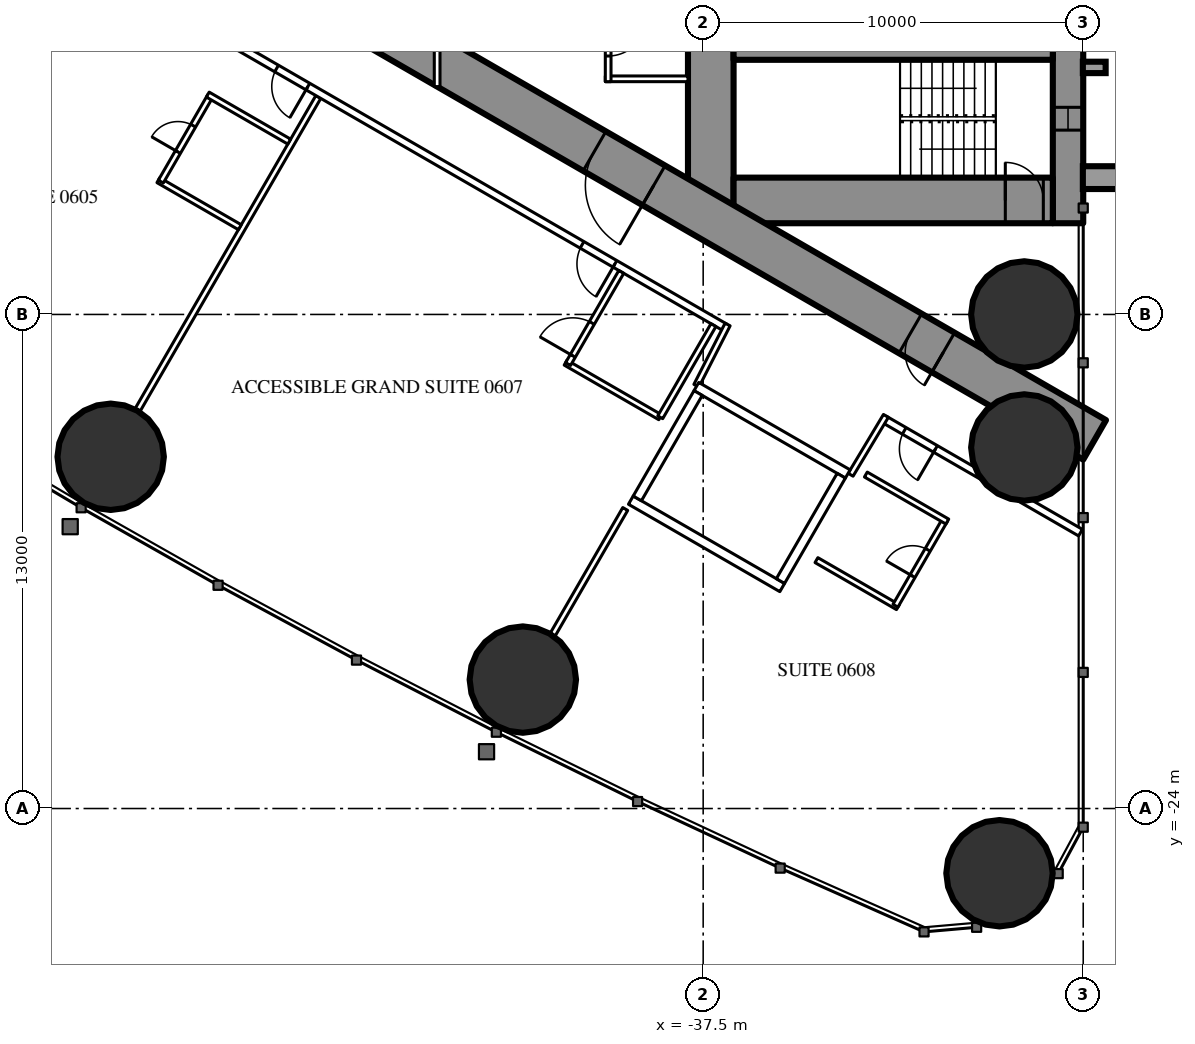
"""IFC4 building model, lengths in metres.
Left out: names, types, materials, properties, quantities, classifications, styles, units other than length and angle.
Written with IfcOpenShell. Run it as: python <this file> out.ifc"""

import sys

from ifc_helpers import new_model, si_unit, direction, frame, frame_2d, origin, origin_2d, place, context, subcontext, project, spatial, rectangle, hollow_circle, extrude, element, fill, save


model = new_model("IFC4")
c1 = context("Model", 3, precision=1e-05, world=origin(), true_north=direction((0.0, 1.0)))
c2 = subcontext(c1, "Body", "Model", "MODEL_VIEW")
j1 = project(units=[si_unit("LENGTHUNIT", "METRE"), si_unit("PLANEANGLEUNIT", "RADIAN")], contexts=[c1])
p1 = place(None, origin())
s1 = spatial("IfcSite", under=j1, at=p1, CompositionType="ELEMENT")
p2 = place(p1, origin())
s2 = spatial("IfcBuilding", under=s1, at=p2, CompositionType="ELEMENT")
p3 = place(p2, frame((0.0, 0.0, 28.5)))
s3 = spatial("IfcBuildingStorey", under=s2, at=p3, CompositionType="ELEMENT", Elevation=28.5)
for number, where, z_axis, x_axis in (
    (1, (-29.703, -25.703, 0.0), (0.0, 0.0, 1.0), (1.0, 0.0, 0.0)),
    (2, (-29.05, -11.0, 0.0), (0.0, 0.0, 1.0), (1.0, 0.0, 0.0)),
    (3, (-29.05, -14.5, 0.0), (0.0, 0.0, 1.0), (1.0, 0.0, 0.0)),
    (4, (-53.09, -14.745, 0.0), (0.0, 0.0, 1.0), (1.0, 0.0, 0.0)),
    (5, (-42.245, -20.607, 0.0), (0.0, 0.0, 1.0), (1.0, 0.0, 0.0)),
):
    element("IfcColumn", number, at=place(p3, frame(where, z_axis=z_axis, x_axis=x_axis)), inside=s3, PredefinedType="COLUMN", context=c2, shape_type="SweptSolid", body=[
        extrude(hollow_circle(Radius=1.4, WallThickness=0.12, at=origin_2d()), origin(), (0.0, 0.0, 1.0), 3.5),
    ])
p4 = place(p3, frame((-27.9, 8.6, 0.0), z_axis=(0.0, 0.0, 1.0), x_axis=(0.0, -1.0, 0.0)))
e6 = element("IfcWall", 6, at=p4, inside=s3, PredefinedType="SHEAR", context=c2, shape_type="SweptSolid", body=[
    extrude(rectangle(XDim=17.2, YDim=0.8, at=frame_2d((8.6, 0.0))), origin(), (0.0, 0.0, 1.0), 3.5),
])
p5 = place(p4, frame((2.45, 0.0, 0.6)))
e7 = element("IfcOpeningElement", 7, at=p5, cuts=e6, PredefinedType="OPENING", context=c2, shape_type="SweptSolid", body=[
    extrude(rectangle(XDim=0.6, YDim=2.1, at=frame_2d((0.3, 1.05))), frame((0.0, 0.41, 0.0), z_axis=(0.0, -1.0, 0.0), x_axis=(1.0, 0.0, 0.0)), (0.0, 0.0, 1.0), 0.82),
])
p6 = place(p4, frame((14.15, 0.0, 0.6)))
e8 = element("IfcOpeningElement", 8, at=p6, cuts=e6, PredefinedType="OPENING", context=c2, shape_type="SweptSolid", body=[
    extrude(rectangle(XDim=0.6, YDim=2.1, at=frame_2d((0.3, 1.05))), frame((0.0, 0.41, 0.0), z_axis=(0.0, -1.0, 0.0), x_axis=(1.0, 0.0, 0.0)), (0.0, 0.0, 1.0), 0.82),
])
p7 = place(p3, frame((-37.3, 8.6, 0.0), z_axis=(0.0, 0.0, 1.0), x_axis=(0.0, -1.0, 0.0)))
e9 = element("IfcWall", 9, at=p7, inside=s3, PredefinedType="SHEAR", context=c2, shape_type="SweptSolid", body=[
    extrude(rectangle(XDim=17.2, YDim=1.2, at=frame_2d((8.6, 0.0))), origin(), (0.0, 0.0, 1.0), 3.5),
])
p8 = place(p7, frame((7.7, 0.0, 0.0)))
e10 = element("IfcOpeningElement", 10, at=p8, cuts=e9, PredefinedType="OPENING", context=c2, shape_type="SweptSolid", body=[
    extrude(rectangle(XDim=1.8, YDim=2.2, at=frame_2d((0.9, 1.1))), frame((0.0, 0.61, 0.0), z_axis=(0.0, -1.0, 0.0), x_axis=(1.0, 0.0, 0.0)), (0.0, 0.0, 1.0), 1.22),
])
p9 = place(p3, frame((-28.3, -8.0, 0.0), z_axis=(0.0, 0.0, 1.0), x_axis=(-1.0, 0.0, 0.0)))
e11 = element("IfcWall", 11, at=p9, inside=s3, PredefinedType="SHEAR", context=c2, shape_type="SweptSolid", body=[
    extrude(rectangle(XDim=8.4, YDim=1.2, at=frame_2d((4.2, 0.0))), origin(), (0.0, 0.0, 1.0), 3.5),
])
p10 = place(p9, frame((0.25, 0.0, 0.0)))
e12 = element("IfcOpeningElement", 12, at=p10, cuts=e11, PredefinedType="OPENING", context=c2, shape_type="SweptSolid", body=[
    extrude(rectangle(XDim=1.0, YDim=2.2, at=frame_2d((0.5, 1.1))), frame((0.0, 0.61, 0.0), z_axis=(0.0, -1.0, 0.0), x_axis=(1.0, 0.0, 0.0)), (0.0, 0.0, 1.0), 1.22),
])
p11 = place(p3, frame((-28.3, -4.15, 0.0), z_axis=(0.0, 0.0, 1.0), x_axis=(-1.0, 0.0, 0.0)))
e13 = element("IfcWall", 13, at=p11, inside=s3, PredefinedType="SHEAR", context=c2, shape_type="SweptSolid", body=[
    extrude(rectangle(XDim=8.4, YDim=0.3, at=frame_2d((4.2, 0.0))), origin(), (0.0, 0.0, 1.0), 3.5),
])
p12 = place(p3, frame((-27.2, -14.3, 0.0), z_axis=(0.0, 0.0, 1.0), x_axis=(-0.866024021859, 0.500002393557, 0.0)))
e14 = element("IfcWall", 14, at=p12, inside=s3, PredefinedType="SHEAR", context=c2, shape_type="SweptSolid", body=[
    extrude(rectangle(XDim=27.907, YDim=1.2, at=frame_2d((13.954, 0.0))), origin(), (0.0, 0.0, 1.0), 3.5),
])
p13 = place(p12, frame((4.6, 0.0, 0.0)))
e15 = element("IfcOpeningElement", 15, at=p13, cuts=e14, PredefinedType="OPENING", context=c2, shape_type="SweptSolid", body=[
    extrude(rectangle(XDim=1.0, YDim=2.2, at=frame_2d((0.5, 1.1))), frame((0.0, 0.61, 0.0), z_axis=(0.0, -1.0, 0.0), x_axis=(1.0, 0.0, 0.0)), (0.0, 0.0, 1.0), 1.22),
])
p14 = place(p12, frame((13.395, 0.0, 0.0)))
e16 = element("IfcOpeningElement", 16, at=p14, cuts=e14, PredefinedType="OPENING", context=c2, shape_type="SweptSolid", body=[
    extrude(rectangle(XDim=1.8, YDim=2.2, at=frame_2d((0.9, 1.1))), frame((0.0, 0.61, 0.0), z_axis=(0.0, -1.0, 0.0), x_axis=(1.0, 0.0, 0.0)), (0.0, 0.0, 1.0), 1.22),
])
p15 = place(p3, frame((-47.627, -5.278, 0.0), z_axis=(0.0, 0.0, 1.0), x_axis=(-0.500009844318, -0.86601972009, 0.0)))
e17 = element("IfcWall", 17, at=p15, inside=s3, PredefinedType="PARTITIONING", context=c2, shape_type="SweptSolid", body=[
    extrude(rectangle(XDim=9.51, YDim=0.15, at=frame_2d((4.755, 0.0))), origin(), (0.0, 0.0, 1.0), 2.25),
])
p16 = place(p3, frame((-39.551, -16.118, 0.0), z_axis=(0.0, 0.0, 1.0), x_axis=(-0.499986503906, -0.866033195618, 0.0)))
e18 = element("IfcWall", 18, at=p16, inside=s3, PredefinedType="PARTITIONING", context=c2, shape_type="SweptSolid", body=[
    extrude(rectangle(XDim=3.815, YDim=0.15, at=frame_2d((1.907, 0.0))), origin(), (0.0, 0.0, 1.0), 3.25),
])
p17 = place(p3, frame((-27.572, -16.741, 0.0), z_axis=(0.0, 0.0, 1.0), x_axis=(-0.866024464444, 0.500001626982, 0.0)))
e19 = element("IfcWall", 19, at=p17, inside=s3, PredefinedType="PARTITIONING", context=c2, shape_type="SweptSolid", body=[
    extrude(rectangle(XDim=5.955, YDim=0.2, at=frame_2d((2.978, 0.0))), origin(), (0.0, 0.0, 1.0), 3.25),
])
p18 = place(p17, frame((4.405, 0.0, 0.0)))
e20 = element("IfcOpeningElement", 20, at=p18, cuts=e19, PredefinedType="OPENING", context=c2, shape_type="SweptSolid", body=[
    extrude(rectangle(XDim=0.95, YDim=2.2, at=frame_2d((0.475, 1.1))), frame((0.0, 0.11, 0.0), z_axis=(0.0, -1.0, 0.0), x_axis=(1.0, 0.0, 0.0)), (0.0, 0.0, 1.0), 0.22),
])
p19 = place(p3, frame((-36.92, -11.344, 0.0), z_axis=(0.0, 0.0, 1.0), x_axis=(-0.866028313256, 0.499994960614, 0.0)))
e21 = element("IfcWall", 21, at=p19, inside=s3, PredefinedType="PARTITIONING", context=c2, shape_type="SweptSolid", body=[
    extrude(rectangle(XDim=22.568, YDim=0.2, at=frame_2d((11.284, 0.0))), origin(), (0.0, 0.0, 1.0), 3.25),
])
p20 = place(p19, frame((12.68, 0.0, 0.0)))
e22 = element("IfcOpeningElement", 22, at=p20, cuts=e21, PredefinedType="OPENING", context=c2, shape_type="SweptSolid", body=[
    extrude(rectangle(XDim=0.95, YDim=2.2, at=frame_2d((0.475, 1.1))), frame((0.0, 0.11, 0.0), z_axis=(0.0, -1.0, 0.0), x_axis=(1.0, 0.0, 0.0)), (0.0, 0.0, 1.0), 0.22),
])
p21 = place(p19, frame((3.35, 0.0, 0.0)))
e23 = element("IfcOpeningElement", 23, at=p21, cuts=e21, PredefinedType="OPENING", context=c2, shape_type="SweptSolid", body=[
    extrude(rectangle(XDim=1.0, YDim=2.2, at=frame_2d((0.5, 1.1))), frame((0.0, 0.11, 0.0), z_axis=(0.0, -1.0, 0.0), x_axis=(1.0, 0.0, 0.0)), (0.0, 0.0, 1.0), 0.22),
])
p22 = place(p3, frame((-36.857, -11.265, 0.0), z_axis=(0.0, 0.0, 1.0), x_axis=(-0.454225294761, -0.890886851176, 0.0)))
e24 = element("IfcWall", 24, at=p22, inside=s3, PredefinedType="PARTITIONING", context=c2, shape_type="SweptSolid", body=[
    extrude(rectangle(XDim=1.807, YDim=0.15, at=frame_2d((0.904, 0.0))), origin(), (0.0, 0.0, 1.0), 3.25),
])
p23 = place(p3, frame((-33.621, -15.218, 0.0), z_axis=(0.0, 0.0, 1.0), x_axis=(0.514336634837, 0.857588377991, 0.0)))
e25 = element("IfcWall", 25, at=p23, inside=s3, PredefinedType="PARTITIONING", context=c2, shape_type="SweptSolid", body=[
    extrude(rectangle(XDim=1.805, YDim=0.15, at=frame_2d((0.903, 0.0))), origin(), (0.0, 0.0, 1.0), 3.25),
])
p24 = place(p3, frame((-49.692, -8.704, 0.0), z_axis=(0.0, 0.0, 1.0), x_axis=(-0.866073894602, 0.499916002032, 0.0)))
e26 = element("IfcWall", 26, at=p24, inside=s3, PredefinedType="PARTITIONING", context=c2, shape_type="SweptSolid", body=[
    extrude(rectangle(XDim=2.475, YDim=0.15, at=frame_2d((1.238, 0.0))), origin(), (0.0, 0.0, 1.0), 3.25),
])
p25 = place(p3, frame((-50.47, -5.253, 0.0), z_axis=(0.0, 0.0, 1.0), x_axis=(-0.500006934395, -0.866021400173, 0.0)))
e27 = element("IfcWall", 27, at=p25, inside=s3, PredefinedType="PARTITIONING", context=c2, shape_type="SweptSolid", body=[
    extrude(rectangle(XDim=2.6, YDim=0.15, at=frame_2d((1.3, 0.0))), origin(), (0.0, 0.0, 1.0), 3.25),
])
p26 = place(p25, frame((0.9, 0.0, 0.0)))
e28 = element("IfcOpeningElement", 28, at=p26, cuts=e27, PredefinedType="OPENING", context=c2, shape_type="SweptSolid", body=[
    extrude(rectangle(XDim=0.8, YDim=2.2, at=frame_2d((0.4, 1.1))), frame((0.0, 0.085, 0.0), z_axis=(0.0, -1.0, 0.0), x_axis=(1.0, 0.0, 0.0)), (0.0, 0.0, 1.0), 0.17),
])
p27 = place(p3, frame((-48.392, -6.453, 0.0), z_axis=(0.0, 0.0, 1.0), x_axis=(-0.86604923931, 0.499958713387, 0.0)))
e29 = element("IfcWall", 29, at=p27, inside=s3, PredefinedType="PARTITIONING", context=c2, shape_type="SweptSolid", body=[
    extrude(rectangle(XDim=2.475, YDim=0.15, at=frame_2d((1.237, 0.0))), origin(), (0.0, 0.0, 1.0), 3.25),
])
p28 = place(p3, frame((-38.63, -13.705, 0.0), z_axis=(0.0, 0.0, 1.0), x_axis=(-0.866018712932, 0.500011588718, 0.0)))
e30 = element("IfcWall", 30, at=p28, inside=s3, PredefinedType="PARTITIONING", context=c2, shape_type="SweptSolid", body=[
    extrude(rectangle(XDim=2.875, YDim=0.15, at=frame_2d((1.438, 0.0))), origin(), (0.0, 0.0, 1.0), 3.25),
])
p29 = place(p3, frame((-39.655, -9.88, 0.0), z_axis=(0.0, 0.0, 1.0), x_axis=(-0.500049511043, -0.865996816683, 0.0)))
e31 = element("IfcWall", 31, at=p29, inside=s3, PredefinedType="PARTITIONING", context=c2, shape_type="SweptSolid", body=[
    extrude(rectangle(XDim=2.8, YDim=0.15, at=frame_2d((1.4, 0.0))), origin(), (0.0, 0.0, 1.0), 3.25),
])
p30 = place(p29, frame((1.55, 0.0, 0.0)))
e32 = element("IfcOpeningElement", 32, at=p30, cuts=e31, PredefinedType="OPENING", context=c2, shape_type="SweptSolid", body=[
    extrude(rectangle(XDim=1.0, YDim=2.2, at=frame_2d((0.5, 1.1))), frame((0.0, 0.085, 0.0), z_axis=(0.0, -1.0, 0.0), x_axis=(1.0, 0.0, 0.0)), (0.0, 0.0, 1.0), 0.17),
])
p31 = place(p3, frame((-37.23, -11.281, 0.0), z_axis=(0.0, 0.0, 1.0), x_axis=(-0.500049511043, -0.865996816683, 0.0)))
e33 = element("IfcWall", 33, at=p31, inside=s3, PredefinedType="PARTITIONING", context=c2, shape_type="SweptSolid", body=[
    extrude(rectangle(XDim=2.8, YDim=0.15, at=frame_2d((1.4, 0.0))), origin(), (0.0, 0.0, 1.0), 3.25),
])
p32 = place(p3, frame((-32.376, -18.702, 0.0), z_axis=(0.0, 0.0, 1.0), x_axis=(-0.866006523861, 0.500032699561, 0.0)))
e34 = element("IfcWall", 34, at=p32, inside=s3, PredefinedType="PARTITIONING", context=c2, shape_type="SweptSolid", body=[
    extrude(rectangle(XDim=2.475, YDim=0.15, at=frame_2d((1.237, 0.0))), origin(), (0.0, 0.0, 1.0), 3.25),
])
p33 = place(p3, frame((-31.141, -16.413, 0.0), z_axis=(0.0, 0.0, 1.0), x_axis=(-0.500006934395, -0.866021400173, 0.0)))
e35 = element("IfcWall", 35, at=p33, inside=s3, PredefinedType="PARTITIONING", context=c2, shape_type="SweptSolid", body=[
    extrude(rectangle(XDim=2.6, YDim=0.15, at=frame_2d((1.3, 0.0))), origin(), (0.0, 0.0, 1.0), 3.25),
])
p34 = place(p33, frame((0.9, 0.0, 0.0)))
e36 = element("IfcOpeningElement", 36, at=p34, cuts=e35, PredefinedType="OPENING", context=c2, shape_type="SweptSolid", body=[
    extrude(rectangle(XDim=0.8, YDim=2.2, at=frame_2d((0.4, 1.1))), frame((0.0, 0.085, 0.0), z_axis=(0.0, -1.0, 0.0), x_axis=(1.0, 0.0, 0.0)), (0.0, 0.0, 1.0), 0.17),
])
p35 = place(p3, frame((-31.076, -16.45, 0.0), z_axis=(0.0, 0.0, 1.0), x_axis=(-0.866073894602, 0.499916002032, 0.0)))
e37 = element("IfcWall", 37, at=p35, inside=s3, PredefinedType="PARTITIONING", context=c2, shape_type="SweptSolid", body=[
    extrude(rectangle(XDim=2.475, YDim=0.15, at=frame_2d((1.238, 0.0))), origin(), (0.0, 0.0, 1.0), 3.25),
])
p36 = place(p3, frame((-37.9, -4.8, 0.0), z_axis=(0.0, 0.0, 1.0), x_axis=(-1.0, 0.0, 0.0)))
e38 = element("IfcWall", 38, at=p36, inside=s3, PredefinedType="PARTITIONING", context=c2, shape_type="SweptSolid", body=[
    extrude(rectangle(XDim=2.175, YDim=0.15, at=frame_2d((1.087, 0.0))), origin(), (0.0, 0.0, 1.0), 3.25),
])
p37 = place(p3, frame((-40.0, -2.525, 0.0), z_axis=(0.0, 0.0, 1.0), x_axis=(0.0, -1.0, 0.0)))
e39 = element("IfcWall", 39, at=p37, inside=s3, PredefinedType="PARTITIONING", context=c2, shape_type="SweptSolid", body=[
    extrude(rectangle(XDim=2.35, YDim=0.15, at=frame_2d((1.175, 0.0))), origin(), (0.0, 0.0, 1.0), 3.25),
])
p38 = place(p37, frame((0.675, 0.0, 0.0)))
e40 = element("IfcOpeningElement", 40, at=p38, cuts=e39, PredefinedType="OPENING", context=c2, shape_type="SweptSolid", body=[
    extrude(rectangle(XDim=1.0, YDim=2.2, at=frame_2d((0.5, 1.1))), frame((0.0, 0.085, 0.0), z_axis=(0.0, -1.0, 0.0), x_axis=(1.0, 0.0, 0.0)), (0.0, 0.0, 1.0), 0.17),
])
p39 = place(p3, frame((-44.5, 5.005, 0.0), z_axis=(0.0, 0.0, 1.0), x_axis=(0.0, -1.0, 0.0)))
e41 = element("IfcWall", 41, at=p39, inside=s3, PredefinedType="PARTITIONING", context=c2, shape_type="SweptSolid", body=[
    extrude(rectangle(XDim=10.009, YDim=0.15, at=frame_2d((5.005, 0.0))), origin(), (0.0, 0.0, 1.0), 2.45),
])
p40 = place(p39, frame((2.002, 0.0, 0.0)))
e42 = element("IfcOpeningElement", 42, at=p40, cuts=e41, PredefinedType="OPENING", context=c2, shape_type="SweptSolid", body=[
    extrude(rectangle(XDim=1.0, YDim=2.2, at=frame_2d((0.5, 1.1))), frame((0.0, 0.085, 0.0), z_axis=(0.0, -1.0, 0.0), x_axis=(1.0, 0.0, 0.0)), (0.0, 0.0, 1.0), 0.17),
])
p41 = place(p39, frame((7.007, 0.0, 0.0)))
e43 = element("IfcOpeningElement", 43, at=p41, cuts=e41, PredefinedType="OPENING", context=c2, shape_type="SweptSolid", body=[
    extrude(rectangle(XDim=1.0, YDim=2.2, at=frame_2d((0.5, 1.1))), frame((0.0, 0.085, 0.0), z_axis=(0.0, -1.0, 0.0), x_axis=(1.0, 0.0, 0.0)), (0.0, 0.0, 1.0), 0.17),
])
p42 = place(p3, frame((-33.696, -15.197, 0.0), z_axis=(0.0, 0.0, 1.0), x_axis=(-0.865976953817, 0.500083908417, 0.0)))
e44 = element("IfcWall", 44, at=p42, inside=s3, PredefinedType="PARTITIONING", context=c2, shape_type="SweptSolid", body=[
    extrude(rectangle(XDim=4.599, YDim=0.25, at=frame_2d((2.3, 0.0))), origin(), (0.0, 0.0, 1.0), 3.25),
])
p43 = place(p3, frame((-35.42, -18.186, 0.0), z_axis=(0.0, 0.0, 1.0), x_axis=(-0.865990227814, 0.50006092162, 0.0)))
e45 = element("IfcWall", 45, at=p43, inside=s3, PredefinedType="PARTITIONING", context=c2, shape_type="SweptSolid", body=[
    extrude(rectangle(XDim=4.6, YDim=0.25, at=frame_2d((2.3, 0.0))), origin(), (0.0, 0.0, 1.0), 3.25),
])
p44 = place(p3, frame((-33.866, -15.243, 0.0), z_axis=(0.0, 0.0, 1.0), x_axis=(-0.499929347863, -0.866066190972, 0.0)))
e46 = element("IfcWall", 46, at=p44, inside=s3, PredefinedType="PARTITIONING", context=c2, shape_type="SweptSolid", body=[
    extrude(rectangle(XDim=3.201, YDim=0.25, at=frame_2d((1.6, 0.0))), origin(), (0.0, 0.0, 1.0), 3.25),
])
p45 = place(p3, frame((-37.633, -13.068, 0.0), z_axis=(0.0, 0.0, 1.0), x_axis=(-0.499872130319, -0.866099216793, 0.0)))
e47 = element("IfcWall", 47, at=p45, inside=s3, PredefinedType="PARTITIONING", context=c2, shape_type="SweptSolid", body=[
    extrude(rectangle(XDim=3.2, YDim=0.25, at=frame_2d((1.6, 0.0))), origin(), (0.0, 0.0, 1.0), 3.25),
])
p46 = place(p26, origin())
e48 = element("IfcDoor", 48, at=p46, inside=s3, OperationType="SINGLE_SWING_RIGHT", PredefinedType="DOOR", context=c2, shape_type="SweptSolid", body=[
    extrude(rectangle(XDim=0.8, YDim=2.2, at=frame_2d((0.4, 1.1))), frame((0.0, 0.025, 0.0), z_axis=(0.0, -1.0, 0.0), x_axis=(1.0, 0.0, 0.0)), (0.0, 0.0, 1.0), 0.05),
])
fill(e28, e48)
p47 = place(p20, origin())
e49 = element("IfcDoor", 49, at=p47, inside=s3, OperationType="SINGLE_SWING_LEFT", PredefinedType="DOOR", context=c2, shape_type="SweptSolid", body=[
    extrude(rectangle(XDim=0.95, YDim=2.2, at=frame_2d((0.475, 1.1))), frame((0.0, 0.025, 0.0), z_axis=(0.0, -1.0, 0.0), x_axis=(1.0, 0.0, 0.0)), (0.0, 0.0, 1.0), 0.05),
])
fill(e22, e49)
p48 = place(p30, origin())
e50 = element("IfcDoor", 50, at=p48, inside=s3, OperationType="SINGLE_SWING_RIGHT", PredefinedType="DOOR", context=c2, shape_type="SweptSolid", body=[
    extrude(rectangle(XDim=1.0, YDim=2.2, at=frame_2d((0.5, 1.1))), frame((0.0, 0.025, 0.0), z_axis=(0.0, -1.0, 0.0), x_axis=(1.0, 0.0, 0.0)), (0.0, 0.0, 1.0), 0.05),
])
fill(e32, e50)
p49 = place(p21, origin())
e51 = element("IfcDoor", 51, at=p49, inside=s3, OperationType="SINGLE_SWING_LEFT", PredefinedType="DOOR", context=c2, shape_type="SweptSolid", body=[
    extrude(rectangle(XDim=1.0, YDim=2.2, at=frame_2d((0.5, 1.1))), frame((0.0, 0.025, 0.0), z_axis=(0.0, -1.0, 0.0), x_axis=(1.0, 0.0, 0.0)), (0.0, 0.0, 1.0), 0.05),
])
fill(e23, e51)
p50 = place(p34, origin())
e52 = element("IfcDoor", 52, at=p50, inside=s3, OperationType="SINGLE_SWING_RIGHT", PredefinedType="DOOR", context=c2, shape_type="SweptSolid", body=[
    extrude(rectangle(XDim=0.8, YDim=2.2, at=frame_2d((0.4, 1.1))), frame((0.0, 0.025, 0.0), z_axis=(0.0, -1.0, 0.0), x_axis=(1.0, 0.0, 0.0)), (0.0, 0.0, 1.0), 0.05),
])
fill(e36, e52)
p51 = place(p18, origin())
e53 = element("IfcDoor", 53, at=p51, inside=s3, OperationType="SINGLE_SWING_LEFT", PredefinedType="DOOR", context=c2, shape_type="SweptSolid", body=[
    extrude(rectangle(XDim=0.95, YDim=2.2, at=frame_2d((0.475, 1.1))), frame((0.0, 0.025, 0.0), z_axis=(0.0, -1.0, 0.0), x_axis=(1.0, 0.0, 0.0)), (0.0, 0.0, 1.0), 0.05),
])
fill(e20, e53)
p52 = place(p38, origin())
e54 = element("IfcDoor", 54, at=p52, inside=s3, OperationType="SINGLE_SWING_LEFT", PredefinedType="DOOR", context=c2, shape_type="SweptSolid", body=[
    extrude(rectangle(XDim=1.0, YDim=2.2, at=frame_2d((0.5, 1.1))), frame((0.0, 0.025, 0.0), z_axis=(0.0, -1.0, 0.0), x_axis=(1.0, 0.0, 0.0)), (0.0, 0.0, 1.0), 0.05),
])
fill(e40, e54)
p53 = place(p13, origin())
e55 = element("IfcDoor", 55, at=p53, inside=s3, OperationType="SINGLE_SWING_LEFT", PredefinedType="DOOR", context=c2, shape_type="SweptSolid", body=[
    extrude(rectangle(XDim=1.0, YDim=2.2, at=frame_2d((0.5, 1.1))), frame((0.0, 0.025, 0.0), z_axis=(0.0, -1.0, 0.0), x_axis=(1.0, 0.0, 0.0)), (0.0, 0.0, 1.0), 0.05),
])
fill(e15, e55)
p54 = place(p14, origin())
e56 = element("IfcDoor", 56, at=p54, inside=s3, OperationType="DOUBLE_DOOR_SINGLE_SWING", PredefinedType="DOOR", context=c2, shape_type="SweptSolid", body=[
    extrude(rectangle(XDim=1.8, YDim=2.2, at=frame_2d((0.9, 1.1))), frame((0.0, 0.025, 0.0), z_axis=(0.0, -1.0, 0.0), x_axis=(1.0, 0.0, 0.0)), (0.0, 0.0, 1.0), 0.05),
])
fill(e16, e56)
p55 = place(p10, origin())
e57 = element("IfcDoor", 57, at=p55, inside=s3, OperationType="SINGLE_SWING_RIGHT", PredefinedType="DOOR", context=c2, shape_type="SweptSolid", body=[
    extrude(rectangle(XDim=1.0, YDim=2.2, at=frame_2d((0.5, 1.1))), frame((0.0, 0.025, 0.0), z_axis=(0.0, -1.0, 0.0), x_axis=(1.0, 0.0, 0.0)), (0.0, 0.0, 1.0), 0.05),
])
fill(e12, e57)
p56 = place(p6, origin())
e58 = element("IfcWindow", 58, at=p56, inside=s3, PartitioningType="SINGLE_PANEL", PredefinedType="WINDOW", context=c2, shape_type="SweptSolid", body=[
    extrude(rectangle(XDim=0.6, YDim=2.1, at=frame_2d((0.3, 1.05))), frame((0.0, 0.03, 0.0), z_axis=(0.0, -1.0, 0.0), x_axis=(1.0, 0.0, 0.0)), (0.0, 0.0, 1.0), 0.06),
])
fill(e8, e58)
save(model, sys.argv[1])
